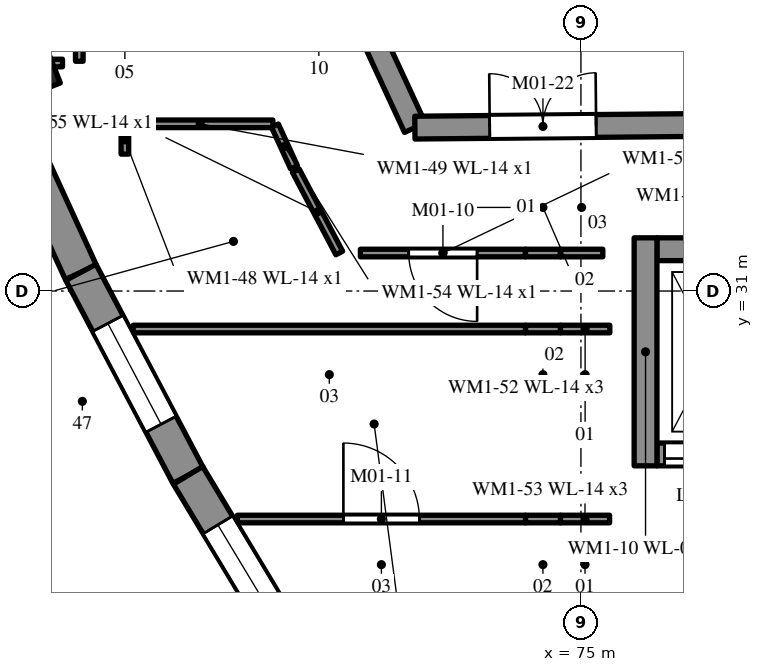
"""IFC4 building model, lengths in metres.
Left out: names, types, materials, properties, quantities, classifications, styles, units other than length and angle.
Written with IfcOpenShell. Run it as: python <this file> out.ifc"""

import sys

from ifc_helpers import new_model, si_unit, direction, frame, frame_2d, origin, origin_2d, place, context, subcontext, project, spatial, rectangle, extrude, element, fill, save


model = new_model("IFC4")
c1 = context("Model", 3, precision=1e-05, world=origin(), true_north=direction((0.0, 1.0)))
c2 = subcontext(c1, "Body", "Model", "MODEL_VIEW")
j1 = project(units=[si_unit("LENGTHUNIT", "METRE"), si_unit("PLANEANGLEUNIT", "RADIAN")], contexts=[c1])
p1 = place(None, origin())
s1 = spatial("IfcSite", under=j1, at=p1, CompositionType="ELEMENT")
p2 = place(p1, origin())
s2 = spatial("IfcBuilding", under=s1, at=p2, CompositionType="ELEMENT")
p3 = place(p2, frame((0.0, 0.0, 5.4)))
s3 = spatial("IfcBuildingStorey", under=s2, at=p3, CompositionType="ELEMENT", Elevation=5.4)
p4 = place(p3, frame((67.163, 33.993, 0.0), z_axis=(0.0, 0.0, 1.0), x_axis=(0.416407051835, -0.909178292296, 0.0)))
e1 = element("IfcWall", 1, at=p4, inside=s3, PredefinedType="SOLIDWALL", context=c2, shape_type="SweptSolid", body=[
    extrude(rectangle(XDim=3.021, YDim=0.45, at=frame_2d((1.511, 0.0))), origin(), (0.0, 0.0, 1.0), 4.8),
])
p5 = place(p3, frame((68.421, 31.246, 0.0), z_axis=(0.0, 0.0, 1.0), x_axis=(0.466728769487, -0.884400506407, 0.0)))
e2 = element("IfcWall", 2, at=p5, inside=s3, PredefinedType="SOLIDWALL", context=c2, shape_type="SweptSolid", body=[
    extrude(rectangle(XDim=3.021, YDim=0.45, at=frame_2d((1.51, 0.0))), origin(), (0.0, 0.0, 1.0), 4.8),
])
p6 = place(p5, frame((0.76, 0.0, 0.9)))
e3 = element("IfcOpeningElement", 3, at=p6, cuts=e2, PredefinedType="OPENING", context=c2, shape_type="SweptSolid", body=[
    extrude(rectangle(XDim=1.5, YDim=2.1, at=frame_2d((0.75, 1.05))), frame((0.0, 0.235, 0.0), z_axis=(0.0, -1.0, 0.0), x_axis=(1.0, 0.0, 0.0)), (0.0, 0.0, 1.0), 0.47),
])
p7 = place(p3, frame((69.831, 28.575, 0.0), z_axis=(0.0, 0.0, 1.0), x_axis=(0.515636119523, -0.856807675177, 0.0)))
e4 = element("IfcWall", 4, at=p7, inside=s3, PredefinedType="SOLIDWALL", context=c2, shape_type="SweptSolid", body=[
    extrude(rectangle(XDim=3.021, YDim=0.45, at=frame_2d((1.511, 0.0))), origin(), (0.0, 0.0, 1.0), 4.8),
])
p8 = place(p7, frame((0.76, 0.0, 0.9)))
e5 = element("IfcOpeningElement", 5, at=p8, cuts=e4, PredefinedType="OPENING", context=c2, shape_type="SweptSolid", body=[
    extrude(rectangle(XDim=1.5, YDim=2.1, at=frame_2d((0.75, 1.05))), frame((0.0, 0.235, 0.0), z_axis=(0.0, -1.0, 0.0), x_axis=(1.0, 0.0, 0.0)), (0.0, 0.0, 1.0), 0.47),
])
p9 = place(p3, frame((71.558, 35.865, 0.0), z_axis=(0.0, 0.0, 1.0), x_axis=(0.420315192535, -0.907378167538, 0.0)))
e6 = element("IfcWall", 6, at=p9, inside=s3, PredefinedType="SHEAR", context=c2, shape_type="SweptSolid", body=[
    extrude(rectangle(XDim=2.992, YDim=0.3, at=frame_2d((1.496, 0.0))), origin(), (0.0, 0.0, 1.0), 4.8),
])
p10 = place(p3, frame((72.815, 33.15, 0.0), z_axis=(0.0, 0.0, 1.0), x_axis=(0.999957788763, 0.009188073348, 0.0)))
e7 = element("IfcWall", 7, at=p10, inside=s3, PredefinedType="SHEAR", context=c2, shape_type="SweptSolid", body=[
    extrude(rectangle(XDim=22.479, YDim=0.3, at=frame_2d((11.24, 0.0))), origin(), (0.0, 0.0, 1.0), 4.8),
])
p11 = place(p10, frame((0.985, 0.0, 0.0)))
e8 = element("IfcOpeningElement", 8, at=p11, cuts=e7, PredefinedType="OPENING", context=c2, shape_type="SweptSolid", body=[
    extrude(rectangle(XDim=1.4, YDim=2.1, at=frame_2d((0.7, 1.05))), frame((0.0, 0.16, 0.0), z_axis=(0.0, -1.0, 0.0), x_axis=(1.0, 0.0, 0.0)), (0.0, 0.0, 1.0), 0.32),
])
p12 = place(p10, frame((10.485, 0.0, 0.0)))
e9 = element("IfcOpeningElement", 9, at=p12, cuts=e7, PredefinedType="OPENING", context=c2, shape_type="SweptSolid", body=[
    extrude(rectangle(XDim=1.4, YDim=2.1, at=frame_2d((0.7, 1.05))), frame((0.0, 0.16, 0.0), z_axis=(0.0, -1.0, 0.0), x_axis=(1.0, 0.0, 0.0)), (0.0, 0.0, 1.0), 0.32),
])
p13 = place(p10, frame((19.985, 0.0, 0.0)))
e10 = element("IfcOpeningElement", 10, at=p13, cuts=e7, PredefinedType="OPENING", context=c2, shape_type="SweptSolid", body=[
    extrude(rectangle(XDim=1.4, YDim=2.1, at=frame_2d((0.7, 1.05))), frame((0.0, 0.16, 0.0), z_axis=(0.0, -1.0, 0.0), x_axis=(1.0, 0.0, 0.0)), (0.0, 0.0, 1.0), 0.32),
])
p14 = place(p3, frame((67.651, 34.186, 0.0), z_axis=(0.0, 0.0, 1.0), x_axis=(0.366955870742, -0.930238350601, 0.0)))
e11 = element("IfcColumn", 11, at=p14, inside=s3, PredefinedType="PILASTER", context=c2, shape_type="SweptSolid", body=[
    extrude(rectangle(XDim=1.2, YDim=0.6, at=origin_2d()), origin(), (0.0, 0.0, 1.0), 4.8),
])
p15 = place(p3, frame((76.0, 28.85, 0.0), z_axis=(0.0, 0.0, 1.0), x_axis=(1.0, 0.0, 0.0)))
e12 = element("IfcWall", 12, at=p15, inside=s3, PredefinedType="SHEAR", context=c2, shape_type="SweptSolid", body=[
    extrude(rectangle(XDim=1.5, YDim=0.3, at=frame_2d((0.75, 0.0))), origin(), (0.0, 0.0, 1.0), 4.8),
])
p16 = place(p15, frame((0.1, 0.0, 0.0)))
e13 = element("IfcOpeningElement", 13, at=p16, cuts=e12, PredefinedType="OPENING", context=c2, shape_type="SweptSolid", body=[
    extrude(rectangle(XDim=1.3, YDim=2.3, at=frame_2d((0.65, 1.15))), frame((0.0, 0.16, 0.0), z_axis=(0.0, -1.0, 0.0), x_axis=(1.0, 0.0, 0.0)), (0.0, 0.0, 1.0), 0.32),
])
p17 = place(p3, frame((77.5, 31.55, 0.0), z_axis=(0.0, 0.0, 1.0), x_axis=(-1.0, 0.0, 0.0)))
e14 = element("IfcWall", 14, at=p17, inside=s3, PredefinedType="SHEAR", context=c2, shape_type="SweptSolid", body=[
    extrude(rectangle(XDim=1.5, YDim=0.3, at=frame_2d((0.75, 0.0))), origin(), (0.0, 0.0, 1.0), 4.8),
])
p18 = place(p3, frame((75.85, 31.7, 0.0), z_axis=(0.0, 0.0, 1.0), x_axis=(0.0, -1.0, 0.0)))
e15 = element("IfcWall", 15, at=p18, inside=s3, PredefinedType="SHEAR", context=c2, shape_type="SweptSolid", body=[
    extrude(rectangle(XDim=3.0, YDim=0.3, at=frame_2d((1.5, 0.0))), origin(), (0.0, 0.0, 1.0), 4.8),
])
p19 = place(p3, frame((68.179, 34.0, 0.0), z_axis=(0.0, 0.0, 1.0), x_axis=(-1.0, 0.0, 0.0)))
e16 = element("IfcWall", 16, at=p19, inside=s3, PredefinedType="PARTITIONING", context=c2, shape_type="SweptSolid", body=[
    extrude(rectangle(XDim=0.731, YDim=0.1, at=frame_2d((0.366, 0.0))), origin(), (0.0, 0.0, 1.0), 4.55),
])
p20 = place(p3, frame((68.4, 34.82, 0.0), z_axis=(0.0, 0.0, 1.0), x_axis=(0.0, -1.0, 0.0)))
e17 = element("IfcWall", 17, at=p20, inside=s3, PredefinedType="PARTITIONING", context=c2, shape_type="SweptSolid", body=[
    extrude(rectangle(XDim=0.797, YDim=0.1, at=frame_2d((0.398, 0.0))), origin(), (0.0, 0.0, 1.0), 4.55),
])
p21 = place(p3, frame((69.0, 32.801, 0.0), z_axis=(0.0, 0.0, 1.0), x_axis=(0.0, 1.0, 0.0)))
e18 = element("IfcWall", 18, at=p21, inside=s3, PredefinedType="PARTITIONING", context=c2, shape_type="SweptSolid", body=[
    extrude(rectangle(XDim=0.375, YDim=0.1, at=frame_2d((0.188, 0.0))), origin(), (0.0, 0.0, 1.0), 4.55),
])
p22 = place(p3, frame((69.033, 33.2, 0.0), z_axis=(0.0, 0.0, 1.0), x_axis=(1.0, 0.0, 0.0)))
e19 = element("IfcWall", 19, at=p22, inside=s3, PredefinedType="PARTITIONING", context=c2, shape_type="SweptSolid", body=[
    extrude(rectangle(XDim=1.914, YDim=0.1, at=frame_2d((0.957, 0.0))), origin(), (0.0, 0.0, 1.0), 4.55),
])
p23 = place(p3, frame((75.38, 30.5, 0.0), z_axis=(0.0, 0.0, 1.0), x_axis=(-1.0, 0.0, 0.0)))
e20 = element("IfcWall", 20, at=p23, inside=s3, PredefinedType="PARTITIONING", context=c2, shape_type="SweptSolid", body=[
    extrude(rectangle(XDim=0.65, YDim=0.1, at=frame_2d((0.325, 0.0))), origin(), (0.0, 0.0, 1.0), 4.55),
])
p24 = place(p3, frame((74.73, 30.5, 0.0), z_axis=(0.0, 0.0, 1.0), x_axis=(-1.0, 0.0, 0.0)))
e21 = element("IfcWall", 21, at=p24, inside=s3, PredefinedType="PARTITIONING", context=c2, shape_type="SweptSolid", body=[
    extrude(rectangle(XDim=0.46, YDim=0.1, at=frame_2d((0.23, 0.0))), origin(), (0.0, 0.0, 1.0), 3.72),
])
p25 = place(p3, frame((74.27, 30.5, 0.0), z_axis=(0.0, 0.0, 1.0), x_axis=(-1.0, 0.0, 0.0)))
e22 = element("IfcWall", 22, at=p25, inside=s3, PredefinedType="PARTITIONING", context=c2, shape_type="SweptSolid", body=[
    extrude(rectangle(XDim=5.161, YDim=0.1, at=frame_2d((2.581, 0.0))), origin(), (0.0, 0.0, 1.0), 4.55),
])
p26 = place(p3, frame((75.377, 28.0, 0.0), z_axis=(0.0, 0.0, 1.0), x_axis=(-1.0, 0.0, 0.0)))
e23 = element("IfcWall", 23, at=p26, inside=s3, PredefinedType="PARTITIONING", context=c2, shape_type="SweptSolid", body=[
    extrude(rectangle(XDim=0.647, YDim=0.1, at=frame_2d((0.323, 0.0))), origin(), (0.0, 0.0, 1.0), 4.55),
])
p27 = place(p3, frame((74.73, 28.0, 0.0), z_axis=(0.0, 0.0, 1.0), x_axis=(-1.0, 0.0, 0.0)))
e24 = element("IfcWall", 24, at=p27, inside=s3, PredefinedType="PARTITIONING", context=c2, shape_type="SweptSolid", body=[
    extrude(rectangle(XDim=0.46, YDim=0.1, at=frame_2d((0.23, 0.0))), origin(), (0.0, 0.0, 1.0), 3.72),
])
p28 = place(p3, frame((74.27, 28.0, 0.0), z_axis=(0.0, 0.0, 1.0), x_axis=(-1.0, 0.0, 0.0)))
e25 = element("IfcWall", 25, at=p28, inside=s3, PredefinedType="PARTITIONING", context=c2, shape_type="SweptSolid", body=[
    extrude(rectangle(XDim=3.791, YDim=0.1, at=frame_2d((1.896, 0.0))), origin(), (0.0, 0.0, 1.0), 4.55),
])
p29 = place(p28, frame((1.395, 0.0, 0.0)))
e26 = element("IfcOpeningElement", 26, at=p29, cuts=e25, PredefinedType="OPENING", context=c2, shape_type="SweptSolid", body=[
    extrude(rectangle(XDim=1.0, YDim=2.1, at=frame_2d((0.5, 1.05))), frame((0.0, 0.06, 0.0), z_axis=(0.0, -1.0, 0.0), x_axis=(1.0, 0.0, 0.0)), (0.0, 0.0, 1.0), 0.12),
])
p30 = place(p3, frame((70.974, 33.177, 0.0), z_axis=(0.0, 0.0, 1.0), x_axis=(0.416055955945, -0.909339013527, 0.0)))
e27 = element("IfcWall", 27, at=p30, inside=s3, PredefinedType="PARTITIONING", context=c2, shape_type="SweptSolid", body=[
    extrude(rectangle(XDim=0.604, YDim=0.1, at=frame_2d((0.302, 0.0))), origin(), (0.0, 0.0, 1.0), 4.55),
])
p31 = place(p3, frame((71.249, 32.583, 0.0), z_axis=(0.0, 0.0, 1.0), x_axis=(0.466970962101, -0.884272650575, 0.0)))
e28 = element("IfcWall", 28, at=p31, inside=s3, PredefinedType="PARTITIONING", context=c2, shape_type="SweptSolid", body=[
    extrude(rectangle(XDim=1.224, YDim=0.1, at=frame_2d((0.612, 0.0))), origin(), (0.0, 0.0, 1.0), 4.55),
])
p32 = place(p3, frame((72.098, 31.5, 0.0), z_axis=(0.0, 0.0, 1.0), x_axis=(1.0, 0.0, 0.0)))
e29 = element("IfcWall", 29, at=p32, inside=s3, PredefinedType="PARTITIONING", context=c2, shape_type="SweptSolid", body=[
    extrude(rectangle(XDim=2.172, YDim=0.1, at=frame_2d((1.086, 0.0))), origin(), (0.0, 0.0, 1.0), 4.55),
])
p33 = place(p32, frame((0.636, 0.0, 0.0)))
e30 = element("IfcOpeningElement", 30, at=p33, cuts=e29, PredefinedType="OPENING", context=c2, shape_type="SweptSolid", body=[
    extrude(rectangle(XDim=0.9, YDim=2.1, at=frame_2d((0.45, 1.05))), frame((0.0, 0.06, 0.0), z_axis=(0.0, -1.0, 0.0), x_axis=(1.0, 0.0, 0.0)), (0.0, 0.0, 1.0), 0.12),
])
p34 = place(p3, frame((74.27, 31.5, 0.0), z_axis=(0.0, 0.0, 1.0), x_axis=(1.0, 0.0, 0.0)))
e31 = element("IfcWall", 31, at=p34, inside=s3, PredefinedType="PARTITIONING", context=c2, shape_type="SweptSolid", body=[
    extrude(rectangle(XDim=0.46, YDim=0.1, at=frame_2d((0.23, 0.0))), origin(), (0.0, 0.0, 1.0), 3.72),
])
p35 = place(p3, frame((74.73, 31.5, 0.0), z_axis=(0.0, 0.0, 1.0), x_axis=(1.0, 0.0, 0.0)))
e32 = element("IfcWall", 32, at=p35, inside=s3, PredefinedType="PARTITIONING", context=c2, shape_type="SweptSolid", body=[
    extrude(rectangle(XDim=0.558, YDim=0.1, at=frame_2d((0.279, 0.0))), origin(), (0.0, 0.0, 1.0), 4.55),
])
p36 = place(p16, origin())
e33 = element("IfcDoor", 33, at=p36, inside=s3, OperationType="SLIDING_TO_LEFT", PredefinedType="DOOR", context=c2, shape_type="SweptSolid", body=[
    extrude(rectangle(XDim=1.3, YDim=2.3, at=frame_2d((0.65, 1.15))), frame((0.0, 0.025, 0.0), z_axis=(0.0, -1.0, 0.0), x_axis=(1.0, 0.0, 0.0)), (0.0, 0.0, 1.0), 0.05),
])
fill(e13, e33)
p37 = place(p6, origin())
e34 = element("IfcWindow", 34, at=p37, inside=s3, PartitioningType="SINGLE_PANEL", PredefinedType="WINDOW", context=c2, shape_type="SweptSolid", body=[
    extrude(rectangle(XDim=1.5, YDim=2.1, at=frame_2d((0.75, 1.05))), frame((0.0, 0.03, 0.0), z_axis=(0.0, -1.0, 0.0), x_axis=(1.0, 0.0, 0.0)), (0.0, 0.0, 1.0), 0.06),
])
fill(e3, e34)
p38 = place(p8, origin())
e35 = element("IfcWindow", 35, at=p38, inside=s3, PartitioningType="SINGLE_PANEL", PredefinedType="WINDOW", context=c2, shape_type="SweptSolid", body=[
    extrude(rectangle(XDim=1.5, YDim=2.1, at=frame_2d((0.75, 1.05))), frame((0.0, 0.03, 0.0), z_axis=(0.0, -1.0, 0.0), x_axis=(1.0, 0.0, 0.0)), (0.0, 0.0, 1.0), 0.06),
])
fill(e5, e35)
p39 = place(p33, frame((0.9, 0.0, 0.0), z_axis=(0.0, 0.0, 1.0), x_axis=(-1.0, 0.0, 0.0)))
e36 = element("IfcDoor", 36, at=p39, inside=s3, OperationType="SINGLE_SWING_LEFT", PredefinedType="DOOR", context=c2, shape_type="SweptSolid", body=[
    extrude(rectangle(XDim=0.9, YDim=2.1, at=frame_2d((0.45, 1.05))), frame((0.0, 0.025, 0.0), z_axis=(0.0, -1.0, 0.0), x_axis=(1.0, 0.0, 0.0)), (0.0, 0.0, 1.0), 0.05),
])
fill(e30, e36)
p40 = place(p29, frame((1.0, 0.0, 0.0), z_axis=(0.0, 0.0, 1.0), x_axis=(-1.0, 0.0, 0.0)))
e37 = element("IfcDoor", 37, at=p40, inside=s3, OperationType="SINGLE_SWING_LEFT", PredefinedType="DOOR", context=c2, shape_type="SweptSolid", body=[
    extrude(rectangle(XDim=1.0, YDim=2.1, at=frame_2d((0.5, 1.05))), frame((0.0, 0.025, 0.0), z_axis=(0.0, -1.0, 0.0), x_axis=(1.0, 0.0, 0.0)), (0.0, 0.0, 1.0), 0.05),
])
fill(e26, e37)
p41 = place(p11, origin())
e38 = element("IfcDoor", 38, at=p41, inside=s3, OperationType="DOUBLE_DOOR_SINGLE_SWING", PredefinedType="DOOR", context=c2, shape_type="SweptSolid", body=[
    extrude(rectangle(XDim=1.4, YDim=2.1, at=frame_2d((0.7, 1.05))), frame((0.0, 0.025, 0.0), z_axis=(0.0, -1.0, 0.0), x_axis=(1.0, 0.0, 0.0)), (0.0, 0.0, 1.0), 0.05),
])
fill(e8, e38)
save(model, sys.argv[1])
